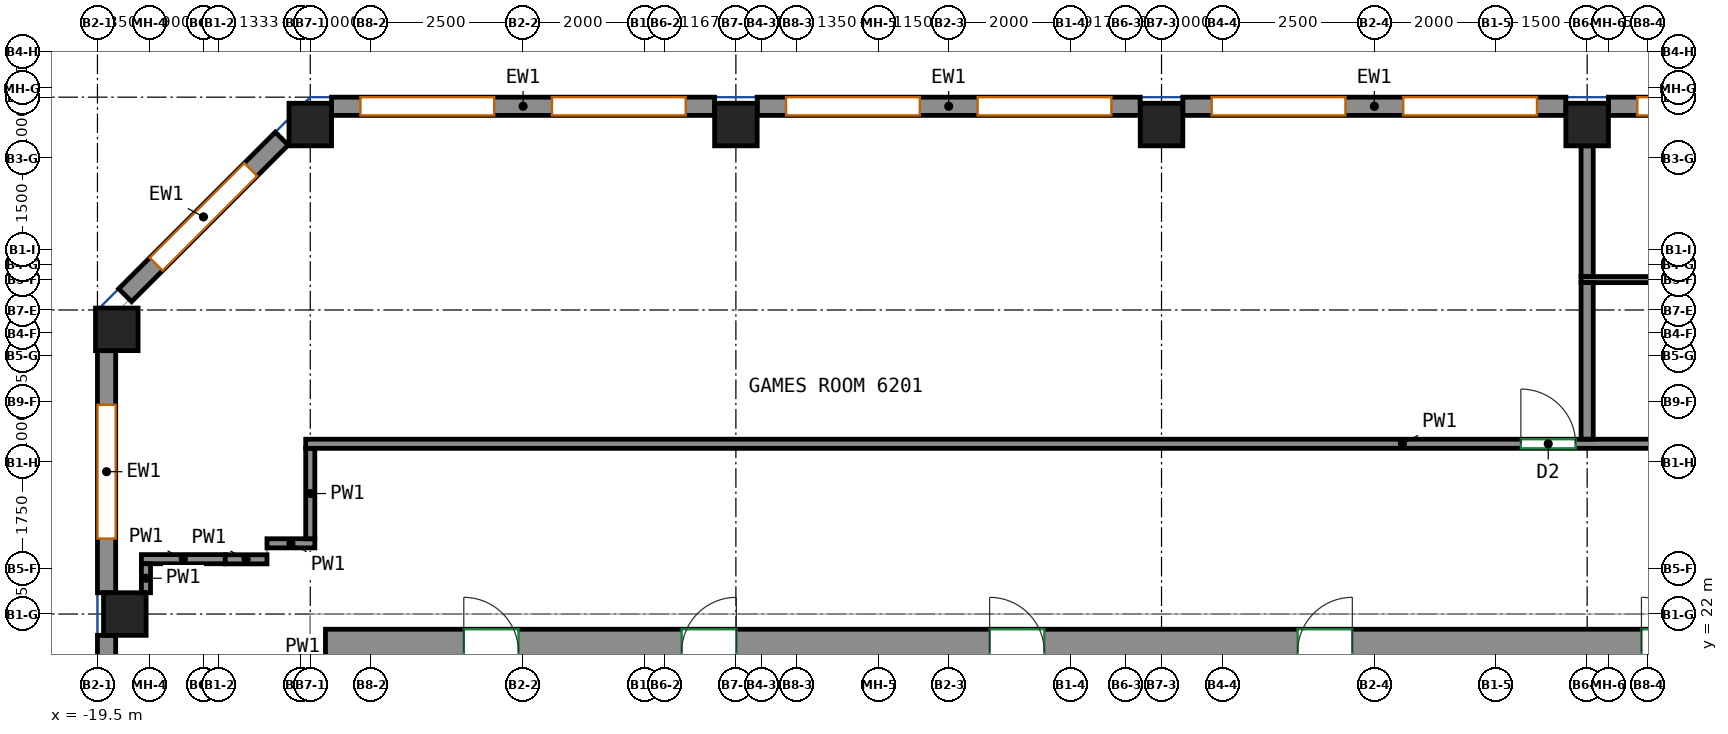
"""IFC4 building model, lengths in metres.
Left out: names, types, materials, properties, quantities, classifications, styles, units other than length and angle.
Written with IfcOpenShell. Run it as: python <this file> out.ifc"""

import sys

from ifc_helpers import new_model, si_unit, direction, frame, frame_2d, origin, origin_2d, place, context, subcontext, project, spatial, rectangle, extrude, source, transform, mapped, element, fill, save


model = new_model("IFC4")
c1 = context("Model", 3, precision=1e-05, world=origin(), true_north=direction((0.0, 1.0)))
c2 = subcontext(c1, "Body", "Model", "MODEL_VIEW")
j1 = project(units=[si_unit("LENGTHUNIT", "METRE"), si_unit("PLANEANGLEUNIT", "RADIAN")], contexts=[c1])
p1 = place(None, origin())
s1 = spatial("IfcSite", under=j1, at=p1, CompositionType="ELEMENT")
p2 = place(p1, origin())
s2 = spatial("IfcBuilding", under=s1, at=p2, CompositionType="ELEMENT")
p3 = place(p2, frame((0.0, 0.0, 256.0)))
s3 = spatial("IfcBuildingStorey", under=s2, at=p3, CompositionType="ELEMENT", Elevation=256.0)
m1 = source(origin(), c2, "Body", "SweptSolid", [
    extrude(rectangle(XDim=0.7, YDim=0.7, at=origin_2d()), origin(), (0.0, 0.0, 1.0), 3.12),
])
for number, where, z_axis, x_axis in (
    (1, (-19.182, 26.682, 0.0), (0.0, 0.0, 1.0), (1.0, 0.0, 0.0)),
    (2, (-19.05, 22.0, 0.0), (0.0, 0.0, 1.0), (1.0, 0.0, 0.0)),
    (3, (-16.0, 30.05, 0.0), (0.0, 0.0, 1.0), (1.0, 0.0, 0.0)),
    (4, (-9.0, 30.05, 0.0), (0.0, 0.0, 1.0), (1.0, 0.0, 0.0)),
    (5, (-2.0, 30.05, 0.0), (0.0, 0.0, 1.0), (1.0, 0.0, 0.0)),
    (6, (5.0, 30.05, 0.0), (0.0, 0.0, 1.0), (1.0, 0.0, 0.0)),
):
    element("IfcColumn", number, at=place(p3, frame(where, z_axis=z_axis, x_axis=x_axis)), inside=s3, PredefinedType="COLUMN", context=c2, shape_type="MappedRepresentation", body=[
        mapped(m1, transform((0.0, 0.0, 0.0))),
    ])
m2 = source(origin(), c2, "Body", "SweptSolid", [
    extrude(rectangle(XDim=33.6, YDim=0.75, at=frame_2d((16.8, 0.0))), origin(), (0.0, 0.0, 1.0), 3.12),
])
p4 = place(p3, frame((-15.75, 21.375, 0.0), z_axis=(0.0, 0.0, 1.0), x_axis=(1.0, 0.0, 0.0)))
e7 = element("IfcWall", 7, at=p4, inside=s3, PredefinedType="SHEAR", context=c2, shape_type="MappedRepresentation", body=[
    mapped(m2, transform((0.0, 0.0, 0.0))),
])
p5 = place(p4, frame((5.858, 0.0, 0.0)))
e8 = element("IfcOpeningElement", 8, at=p5, cuts=e7, PredefinedType="OPENING", context=c2, shape_type="SweptSolid", body=[
    extrude(rectangle(XDim=0.9, YDim=2.1, at=frame_2d((0.45, 1.05))), frame((0.0, 0.385, 0.0), z_axis=(0.0, -1.0, 0.0), x_axis=(1.0, 0.0, 0.0)), (0.0, 0.0, 1.0), 0.77),
])
p6 = place(p4, frame((10.923, 0.0, 0.0)))
e9 = element("IfcOpeningElement", 9, at=p6, cuts=e7, PredefinedType="OPENING", context=c2, shape_type="SweptSolid", body=[
    extrude(rectangle(XDim=0.9, YDim=2.1, at=frame_2d((0.45, 1.05))), frame((0.0, 0.385, 0.0), z_axis=(0.0, -1.0, 0.0), x_axis=(1.0, 0.0, 0.0)), (0.0, 0.0, 1.0), 0.77),
])
p7 = place(p4, frame((15.988, 0.0, 0.0)))
e10 = element("IfcOpeningElement", 10, at=p7, cuts=e7, PredefinedType="OPENING", context=c2, shape_type="SweptSolid", body=[
    extrude(rectangle(XDim=0.9, YDim=2.1, at=frame_2d((0.45, 1.05))), frame((0.0, 0.385, 0.0), z_axis=(0.0, -1.0, 0.0), x_axis=(1.0, 0.0, 0.0)), (0.0, 0.0, 1.0), 0.77),
])
p8 = place(p4, frame((21.643, 0.0, 0.0)))
e11 = element("IfcOpeningElement", 11, at=p8, cuts=e7, PredefinedType="OPENING", context=c2, shape_type="SweptSolid", body=[
    extrude(rectangle(XDim=0.9, YDim=2.1, at=frame_2d((0.45, 1.05))), frame((0.0, 0.385, 0.0), z_axis=(0.0, -1.0, 0.0), x_axis=(1.0, 0.0, 0.0)), (0.0, 0.0, 1.0), 0.77),
])
p9 = place(p4, frame((27.07, 0.0, 0.0)))
e12 = element("IfcOpeningElement", 12, at=p9, cuts=e7, PredefinedType="OPENING", context=c2, shape_type="SweptSolid", body=[
    extrude(rectangle(XDim=0.9, YDim=2.1, at=frame_2d((0.45, 1.05))), frame((0.0, 0.385, 0.0), z_axis=(0.0, -1.0, 0.0), x_axis=(1.0, 0.0, 0.0)), (0.0, 0.0, 1.0), 0.77),
])
p10 = place(p4, frame((2.275, 0.0, 0.0)))
e13 = element("IfcOpeningElement", 13, at=p10, cuts=e7, PredefinedType="OPENING", context=c2, shape_type="SweptSolid", body=[
    extrude(rectangle(XDim=0.9, YDim=2.1, at=frame_2d((0.45, 1.05))), frame((0.0, 0.385, 0.0), z_axis=(0.0, -1.0, 0.0), x_axis=(1.0, 0.0, 0.0)), (0.0, 0.0, 1.0), 0.77),
])
p11 = place(p4, frame((30.425, 0.0, 0.0)))
e14 = element("IfcOpeningElement", 14, at=p11, cuts=e7, PredefinedType="OPENING", context=c2, shape_type="SweptSolid", body=[
    extrude(rectangle(XDim=0.9, YDim=2.1, at=frame_2d((0.45, 1.05))), frame((0.0, 0.385, 0.0), z_axis=(0.0, -1.0, 0.0), x_axis=(1.0, 0.0, 0.0)), (0.0, 0.0, 1.0), 0.77),
])
m3 = source(origin(), c2, "Body", "SweptSolid", [
    extrude(rectangle(XDim=6.3, YDim=0.3, at=frame_2d((3.15, 0.0))), origin(), (0.0, 0.0, 1.0), 3.12),
])
p12 = place(p3, frame((11.65, 30.35, 0.0), z_axis=(0.0, 0.0, 1.0), x_axis=(-1.0, 0.0, 0.0)))
e15 = element("IfcWall", 15, at=p12, inside=s3, PredefinedType="SOLIDWALL", context=c2, shape_type="MappedRepresentation", body=[
    mapped(m3, transform((0.0, 0.0, 0.0))),
])
p13 = place(p12, frame((0.475, 0.0, 0.8)))
e16 = element("IfcOpeningElement", 16, at=p13, cuts=e15, PredefinedType="OPENING", context=c2, shape_type="SweptSolid", body=[
    extrude(rectangle(XDim=2.2, YDim=2.05, at=frame_2d((1.1, 1.025))), frame((0.0, 0.16, 0.0), z_axis=(0.0, -1.0, 0.0), x_axis=(1.0, 0.0, 0.0)), (0.0, 0.0, 1.0), 0.32),
])
p14 = place(p12, frame((3.625, 0.0, 0.8)))
e17 = element("IfcOpeningElement", 17, at=p14, cuts=e15, PredefinedType="OPENING", context=c2, shape_type="SweptSolid", body=[
    extrude(rectangle(XDim=2.2, YDim=2.05, at=frame_2d((1.1, 1.025))), frame((0.0, 0.16, 0.0), z_axis=(0.0, -1.0, 0.0), x_axis=(1.0, 0.0, 0.0)), (0.0, 0.0, 1.0), 0.32),
])
p15 = place(p3, frame((4.65, 30.35, 0.0), z_axis=(0.0, 0.0, 1.0), x_axis=(-1.0, 0.0, 0.0)))
e18 = element("IfcWall", 18, at=p15, inside=s3, PredefinedType="SOLIDWALL", context=c2, shape_type="MappedRepresentation", body=[
    mapped(m3, transform((0.0, 0.0, 0.0))),
])
p16 = place(p15, frame((0.475, 0.0, 0.8)))
e19 = element("IfcOpeningElement", 19, at=p16, cuts=e18, PredefinedType="OPENING", context=c2, shape_type="SweptSolid", body=[
    extrude(rectangle(XDim=2.2, YDim=2.05, at=frame_2d((1.1, 1.025))), frame((0.0, 0.16, 0.0), z_axis=(0.0, -1.0, 0.0), x_axis=(1.0, 0.0, 0.0)), (0.0, 0.0, 1.0), 0.32),
])
p17 = place(p15, frame((3.625, 0.0, 0.8)))
e20 = element("IfcOpeningElement", 20, at=p17, cuts=e18, PredefinedType="OPENING", context=c2, shape_type="SweptSolid", body=[
    extrude(rectangle(XDim=2.2, YDim=2.05, at=frame_2d((1.1, 1.025))), frame((0.0, 0.16, 0.0), z_axis=(0.0, -1.0, 0.0), x_axis=(1.0, 0.0, 0.0)), (0.0, 0.0, 1.0), 0.32),
])
p18 = place(p3, frame((-2.35, 30.35, 0.0), z_axis=(0.0, 0.0, 1.0), x_axis=(-1.0, 0.0, 0.0)))
e21 = element("IfcWall", 21, at=p18, inside=s3, PredefinedType="SOLIDWALL", context=c2, shape_type="MappedRepresentation", body=[
    mapped(m3, transform((0.0, 0.0, 0.0))),
])
p19 = place(p18, frame((0.475, 0.0, 0.8)))
e22 = element("IfcOpeningElement", 22, at=p19, cuts=e21, PredefinedType="OPENING", context=c2, shape_type="SweptSolid", body=[
    extrude(rectangle(XDim=2.2, YDim=2.05, at=frame_2d((1.1, 1.025))), frame((0.0, 0.16, 0.0), z_axis=(0.0, -1.0, 0.0), x_axis=(1.0, 0.0, 0.0)), (0.0, 0.0, 1.0), 0.32),
])
p20 = place(p18, frame((3.625, 0.0, 0.8)))
e23 = element("IfcOpeningElement", 23, at=p20, cuts=e21, PredefinedType="OPENING", context=c2, shape_type="SweptSolid", body=[
    extrude(rectangle(XDim=2.2, YDim=2.05, at=frame_2d((1.1, 1.025))), frame((0.0, 0.16, 0.0), z_axis=(0.0, -1.0, 0.0), x_axis=(1.0, 0.0, 0.0)), (0.0, 0.0, 1.0), 0.32),
])
p21 = place(p3, frame((-9.35, 30.35, 0.0), z_axis=(0.0, 0.0, 1.0), x_axis=(-1.0, 0.0, 0.0)))
e24 = element("IfcWall", 24, at=p21, inside=s3, PredefinedType="SOLIDWALL", context=c2, shape_type="MappedRepresentation", body=[
    mapped(m3, transform((0.0, 0.0, 0.0))),
])
p22 = place(p21, frame((0.475, 0.0, 0.8)))
e25 = element("IfcOpeningElement", 25, at=p22, cuts=e24, PredefinedType="OPENING", context=c2, shape_type="SweptSolid", body=[
    extrude(rectangle(XDim=2.2, YDim=2.05, at=frame_2d((1.1, 1.025))), frame((0.0, 0.16, 0.0), z_axis=(0.0, -1.0, 0.0), x_axis=(1.0, 0.0, 0.0)), (0.0, 0.0, 1.0), 0.32),
])
p23 = place(p21, frame((3.625, 0.0, 0.8)))
e26 = element("IfcOpeningElement", 26, at=p23, cuts=e24, PredefinedType="OPENING", context=c2, shape_type="SweptSolid", body=[
    extrude(rectangle(XDim=2.2, YDim=2.05, at=frame_2d((1.1, 1.025))), frame((0.0, 0.16, 0.0), z_axis=(0.0, -1.0, 0.0), x_axis=(1.0, 0.0, 0.0)), (0.0, 0.0, 1.0), 0.32),
])
m4 = source(origin(), c2, "Body", "SweptSolid", [
    extrude(rectangle(XDim=3.642, YDim=0.3, at=frame_2d((1.821, 0.0))), origin(), (0.0, 0.0, 1.0), 3.12),
])
p24 = place(p3, frame((-16.469, 29.819, 0.0), z_axis=(0.0, 0.0, 1.0), x_axis=(-0.707106781187, -0.707106781187, 0.0)))
e27 = element("IfcWall", 27, at=p24, inside=s3, PredefinedType="SOLIDWALL", context=c2, shape_type="MappedRepresentation", body=[
    mapped(m4, transform((0.0, 0.0, 0.0))),
])
p25 = place(p24, frame((0.721, 0.0, 0.8)))
e28 = element("IfcOpeningElement", 28, at=p25, cuts=e27, PredefinedType="OPENING", context=c2, shape_type="SweptSolid", body=[
    extrude(rectangle(XDim=2.2, YDim=2.05, at=frame_2d((1.1, 1.025))), frame((0.0, 0.16, 0.0), z_axis=(0.0, -1.0, 0.0), x_axis=(1.0, 0.0, 0.0)), (0.0, 0.0, 1.0), 0.32),
])
m5 = source(origin(), c2, "Body", "SweptSolid", [
    extrude(rectangle(XDim=3.982, YDim=0.3, at=frame_2d((1.991, 0.0))), origin(), (0.0, 0.0, 1.0), 3.12),
])
p26 = place(p3, frame((-19.35, 26.332, 0.0), z_axis=(0.0, 0.0, 1.0), x_axis=(0.0, -1.0, 0.0)))
e29 = element("IfcWall", 29, at=p26, inside=s3, PredefinedType="SOLIDWALL", context=c2, shape_type="MappedRepresentation", body=[
    mapped(m5, transform((0.0, 0.0, 0.0))),
])
p27 = place(p26, frame((0.891, 0.0, 0.8)))
e30 = element("IfcOpeningElement", 30, at=p27, cuts=e29, PredefinedType="OPENING", context=c2, shape_type="SweptSolid", body=[
    extrude(rectangle(XDim=2.2, YDim=2.05, at=frame_2d((1.1, 1.025))), frame((0.0, 0.16, 0.0), z_axis=(0.0, -1.0, 0.0), x_axis=(1.0, 0.0, 0.0)), (0.0, 0.0, 1.0), 0.32),
])
m6 = source(origin(), c2, "Body", "SweptSolid", [
    extrude(rectangle(XDim=13.3, YDim=0.3, at=frame_2d((6.65, 0.0))), origin(), (0.0, 0.0, 1.0), 3.12),
])
p28 = place(p3, frame((-19.35, 21.65, 0.0), z_axis=(0.0, 0.0, 1.0), x_axis=(0.0, -1.0, 0.0)))
e31 = element("IfcWall", 31, at=p28, inside=s3, PredefinedType="SOLIDWALL", context=c2, shape_type="MappedRepresentation", body=[
    mapped(m6, transform((0.0, 0.0, 0.0))),
])
p29 = place(p28, frame((0.562, 0.0, 0.8)))
e32 = element("IfcOpeningElement", 32, at=p29, cuts=e31, PredefinedType="OPENING", context=c2, shape_type="SweptSolid", body=[
    extrude(rectangle(XDim=2.2, YDim=2.05, at=frame_2d((1.1, 1.025))), frame((0.0, 0.16, 0.0), z_axis=(0.0, -1.0, 0.0), x_axis=(1.0, 0.0, 0.0)), (0.0, 0.0, 1.0), 0.32),
])
p30 = place(p28, frame((3.887, 0.0, 0.8)))
e33 = element("IfcOpeningElement", 33, at=p30, cuts=e31, PredefinedType="OPENING", context=c2, shape_type="SweptSolid", body=[
    extrude(rectangle(XDim=2.2, YDim=2.05, at=frame_2d((1.1, 1.025))), frame((0.0, 0.16, 0.0), z_axis=(0.0, -1.0, 0.0), x_axis=(1.0, 0.0, 0.0)), (0.0, 0.0, 1.0), 0.32),
])
p31 = place(p28, frame((7.212, 0.0, 0.8)))
e34 = element("IfcOpeningElement", 34, at=p31, cuts=e31, PredefinedType="OPENING", context=c2, shape_type="SweptSolid", body=[
    extrude(rectangle(XDim=2.2, YDim=2.05, at=frame_2d((1.1, 1.025))), frame((0.0, 0.16, 0.0), z_axis=(0.0, -1.0, 0.0), x_axis=(1.0, 0.0, 0.0)), (0.0, 0.0, 1.0), 0.32),
])
p32 = place(p28, frame((10.538, 0.0, 0.8)))
e35 = element("IfcOpeningElement", 35, at=p32, cuts=e31, PredefinedType="OPENING", context=c2, shape_type="SweptSolid", body=[
    extrude(rectangle(XDim=2.2, YDim=2.05, at=frame_2d((1.1, 1.025))), frame((0.0, 0.16, 0.0), z_axis=(0.0, -1.0, 0.0), x_axis=(1.0, 0.0, 0.0)), (0.0, 0.0, 1.0), 0.32),
])
p33 = place(p3, frame((-17.398, 22.902, 0.0), z_axis=(0.0, 0.0, 1.0), x_axis=(-1.0, 0.0, 0.0)))
e36 = element("IfcWall", 36, at=p33, inside=s3, PredefinedType="PARTITIONING", context=c2, shape_type="SweptSolid", body=[
    extrude(rectangle(XDim=1.379, YDim=0.15, at=frame_2d((0.689, 0.0))), origin(), (0.0, 0.0, 1.0), 3.12),
])
p34 = place(p3, frame((-16.712, 22.9, 0.0), z_axis=(0.0, 0.0, 1.0), x_axis=(-1.0, 0.0, 0.0)))
e37 = element("IfcWall", 37, at=p34, inside=s3, PredefinedType="PARTITIONING", context=c2, shape_type="SweptSolid", body=[
    extrude(rectangle(XDim=0.686, YDim=0.15, at=frame_2d((0.343, 0.0))), origin(), (0.0, 0.0, 1.0), 3.12),
])
p35 = place(p3, frame((-15.925, 23.163, 0.0), z_axis=(0.0, 0.0, 1.0), x_axis=(-1.0, 0.0, 0.0)))
e38 = element("IfcWall", 38, at=p35, inside=s3, PredefinedType="PARTITIONING", context=c2, shape_type="SweptSolid", body=[
    extrude(rectangle(XDim=0.787, YDim=0.15, at=frame_2d((0.394, 0.0))), origin(), (0.0, 0.0, 1.0), 3.12),
])
p36 = place(p3, frame((-16.0, 23.238, 0.0), z_axis=(0.0, 0.0, 1.0), x_axis=(0.0, 1.0, 0.0)))
e39 = element("IfcWall", 39, at=p36, inside=s3, PredefinedType="PARTITIONING", context=c2, shape_type="SweptSolid", body=[
    extrude(rectangle(XDim=1.487, YDim=0.15, at=frame_2d((0.744, 0.0))), origin(), (0.0, 0.0, 1.0), 3.12),
])
p37 = place(p3, frame((-16.075, 24.8, 0.0), z_axis=(0.0, 0.0, 1.0), x_axis=(1.0, 0.0, 0.0)))
e40 = element("IfcWall", 40, at=p37, inside=s3, PredefinedType="PARTITIONING", context=c2, shape_type="SweptSolid", body=[
    extrude(rectangle(XDim=36.073, YDim=0.15, at=frame_2d((18.037, 0.0))), origin(), (0.0, 0.0, 1.0), 3.12),
])
p38 = place(p37, frame((19.985, 0.0, 0.0)))
e41 = element("IfcOpeningElement", 41, at=p38, cuts=e40, PredefinedType="OPENING", context=c2, shape_type="SweptSolid", body=[
    extrude(rectangle(XDim=0.9, YDim=2.1, at=frame_2d((0.45, 1.05))), frame((0.0, 0.085, 0.0), z_axis=(0.0, -1.0, 0.0), x_axis=(1.0, 0.0, 0.0)), (0.0, 0.0, 1.0), 0.17),
])
p39 = place(p37, frame((30.884, 0.0, 0.0)))
e42 = element("IfcOpeningElement", 42, at=p39, cuts=e40, PredefinedType="OPENING", context=c2, shape_type="SweptSolid", body=[
    extrude(rectangle(XDim=1.0, YDim=2.1, at=frame_2d((0.5, 1.05))), frame((0.0, 0.085, 0.0), z_axis=(0.0, -1.0, 0.0), x_axis=(1.0, 0.0, 0.0)), (0.0, 0.0, 1.0), 0.17),
])
p40 = place(p3, frame((-18.702, 22.827, 0.0), z_axis=(0.0, 0.0, 1.0), x_axis=(0.0, -1.0, 0.0)))
e43 = element("IfcWall", 43, at=p40, inside=s3, PredefinedType="PARTITIONING", context=c2, shape_type="SweptSolid", body=[
    extrude(rectangle(XDim=0.477, YDim=0.15, at=frame_2d((0.238, 0.0))), origin(), (0.0, 0.0, 1.0), 3.12),
])
p41 = place(p3, frame((4.9, 27.5, 0.0), z_axis=(0.0, 0.0, 1.0), x_axis=(1.0, 0.0, 0.0)))
e44 = element("IfcWall", 44, at=p41, inside=s3, PredefinedType="PARTITIONING", context=c2, shape_type="SweptSolid", body=[
    extrude(rectangle(XDim=17.798, YDim=0.1, at=frame_2d((8.899, 0.0))), origin(), (0.0, 0.0, 1.0), 3.12),
])
p42 = place(p41, frame((8.201, 0.0, 0.0)))
e45 = element("IfcOpeningElement", 45, at=p42, cuts=e44, PredefinedType="OPENING", context=c2, shape_type="SweptSolid", body=[
    extrude(rectangle(XDim=1.0, YDim=2.1, at=frame_2d((0.5, 1.05))), frame((0.0, 0.06, 0.0), z_axis=(0.0, -1.0, 0.0), x_axis=(1.0, 0.0, 0.0)), (0.0, 0.0, 1.0), 0.12),
])
p43 = place(p41, frame((10.897, 0.0, 0.0)))
e46 = element("IfcOpeningElement", 46, at=p43, cuts=e44, PredefinedType="OPENING", context=c2, shape_type="SweptSolid", body=[
    extrude(rectangle(XDim=1.0, YDim=2.1, at=frame_2d((0.5, 1.05))), frame((0.0, 0.06, 0.0), z_axis=(0.0, -1.0, 0.0), x_axis=(1.0, 0.0, 0.0)), (0.0, 0.0, 1.0), 0.12),
])
p44 = place(p3, frame((5.0, 24.877, 0.0), z_axis=(0.0, 0.0, 1.0), x_axis=(0.0, 1.0, 0.0)))
e47 = element("IfcWall", 47, at=p44, inside=s3, PredefinedType="PARTITIONING", context=c2, shape_type="SweptSolid", body=[
    extrude(rectangle(XDim=2.573, YDim=0.2, at=frame_2d((1.287, 0.0))), origin(), (0.0, 0.0, 1.0), 3.12),
])
p45 = place(p3, frame((5.0, 27.552, 0.0), z_axis=(0.0, 0.0, 1.0), x_axis=(0.0, 1.0, 0.0)))
e48 = element("IfcWall", 48, at=p45, inside=s3, PredefinedType="PARTITIONING", context=c2, shape_type="SweptSolid", body=[
    extrude(rectangle(XDim=2.148, YDim=0.2, at=frame_2d((1.074, 0.0))), origin(), (0.0, 0.0, 1.0), 3.12),
])
p46 = place(p14, origin())
e49 = element("IfcWindow", 49, at=p46, inside=s3, PartitioningType="SINGLE_PANEL", PredefinedType="WINDOW", context=c2, shape_type="SweptSolid", body=[
    extrude(rectangle(XDim=2.2, YDim=2.05, at=frame_2d((1.1, 1.025))), frame((0.0, 0.03, 0.0), z_axis=(0.0, -1.0, 0.0), x_axis=(1.0, 0.0, 0.0)), (0.0, 0.0, 1.0), 0.06),
])
fill(e17, e49)
p47 = place(p16, origin())
e50 = element("IfcWindow", 50, at=p47, inside=s3, PartitioningType="SINGLE_PANEL", PredefinedType="WINDOW", context=c2, shape_type="SweptSolid", body=[
    extrude(rectangle(XDim=2.2, YDim=2.05, at=frame_2d((1.1, 1.025))), frame((0.0, 0.03, 0.0), z_axis=(0.0, -1.0, 0.0), x_axis=(1.0, 0.0, 0.0)), (0.0, 0.0, 1.0), 0.06),
])
fill(e19, e50)
p48 = place(p17, origin())
e51 = element("IfcWindow", 51, at=p48, inside=s3, PartitioningType="SINGLE_PANEL", PredefinedType="WINDOW", context=c2, shape_type="SweptSolid", body=[
    extrude(rectangle(XDim=2.2, YDim=2.05, at=frame_2d((1.1, 1.025))), frame((0.0, 0.03, 0.0), z_axis=(0.0, -1.0, 0.0), x_axis=(1.0, 0.0, 0.0)), (0.0, 0.0, 1.0), 0.06),
])
fill(e20, e51)
p49 = place(p19, origin())
e52 = element("IfcWindow", 52, at=p49, inside=s3, PartitioningType="SINGLE_PANEL", PredefinedType="WINDOW", context=c2, shape_type="SweptSolid", body=[
    extrude(rectangle(XDim=2.2, YDim=2.05, at=frame_2d((1.1, 1.025))), frame((0.0, 0.03, 0.0), z_axis=(0.0, -1.0, 0.0), x_axis=(1.0, 0.0, 0.0)), (0.0, 0.0, 1.0), 0.06),
])
fill(e22, e52)
p50 = place(p20, origin())
e53 = element("IfcWindow", 53, at=p50, inside=s3, PartitioningType="SINGLE_PANEL", PredefinedType="WINDOW", context=c2, shape_type="SweptSolid", body=[
    extrude(rectangle(XDim=2.2, YDim=2.05, at=frame_2d((1.1, 1.025))), frame((0.0, 0.03, 0.0), z_axis=(0.0, -1.0, 0.0), x_axis=(1.0, 0.0, 0.0)), (0.0, 0.0, 1.0), 0.06),
])
fill(e23, e53)
p51 = place(p22, origin())
e54 = element("IfcWindow", 54, at=p51, inside=s3, PartitioningType="SINGLE_PANEL", PredefinedType="WINDOW", context=c2, shape_type="SweptSolid", body=[
    extrude(rectangle(XDim=2.2, YDim=2.05, at=frame_2d((1.1, 1.025))), frame((0.0, 0.03, 0.0), z_axis=(0.0, -1.0, 0.0), x_axis=(1.0, 0.0, 0.0)), (0.0, 0.0, 1.0), 0.06),
])
fill(e25, e54)
p52 = place(p23, origin())
e55 = element("IfcWindow", 55, at=p52, inside=s3, PartitioningType="SINGLE_PANEL", PredefinedType="WINDOW", context=c2, shape_type="SweptSolid", body=[
    extrude(rectangle(XDim=2.2, YDim=2.05, at=frame_2d((1.1, 1.025))), frame((0.0, 0.03, 0.0), z_axis=(0.0, -1.0, 0.0), x_axis=(1.0, 0.0, 0.0)), (0.0, 0.0, 1.0), 0.06),
])
fill(e26, e55)
p53 = place(p25, origin())
e56 = element("IfcWindow", 56, at=p53, inside=s3, PartitioningType="SINGLE_PANEL", PredefinedType="WINDOW", context=c2, shape_type="SweptSolid", body=[
    extrude(rectangle(XDim=2.2, YDim=2.05, at=frame_2d((1.1, 1.025))), frame((0.0, 0.03, 0.0), z_axis=(0.0, -1.0, 0.0), x_axis=(1.0, 0.0, 0.0)), (0.0, 0.0, 1.0), 0.06),
])
fill(e28, e56)
p54 = place(p27, origin())
e57 = element("IfcWindow", 57, at=p54, inside=s3, PartitioningType="SINGLE_PANEL", PredefinedType="WINDOW", context=c2, shape_type="SweptSolid", body=[
    extrude(rectangle(XDim=2.2, YDim=2.05, at=frame_2d((1.1, 1.025))), frame((0.0, 0.03, 0.0), z_axis=(0.0, -1.0, 0.0), x_axis=(1.0, 0.0, 0.0)), (0.0, 0.0, 1.0), 0.06),
])
fill(e30, e57)
p55 = place(p38, origin())
e58 = element("IfcDoor", 58, at=p55, inside=s3, OperationType="SINGLE_SWING_LEFT", PredefinedType="DOOR", context=c2, shape_type="SweptSolid", body=[
    extrude(rectangle(XDim=0.9, YDim=2.1, at=frame_2d((0.45, 1.05))), frame((0.0, 0.025, 0.0), z_axis=(0.0, -1.0, 0.0), x_axis=(1.0, 0.0, 0.0)), (0.0, 0.0, 1.0), 0.05),
])
fill(e41, e58)
save(model, sys.argv[1])
